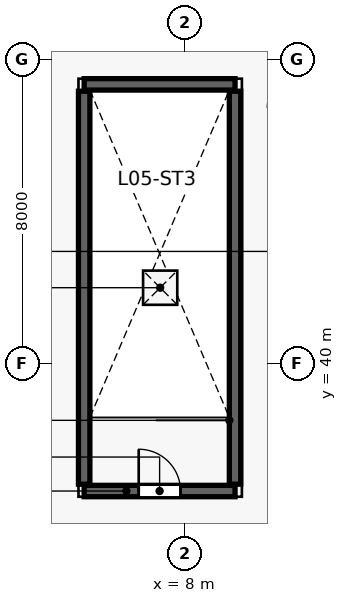
"""IFC4 building model, lengths in metres.
Left out: names, types, materials, properties, quantities, classifications, styles, units other than length and angle.
Written with IfcOpenShell. Run it as: python <this file> out.ifc"""

import sys

from ifc_helpers import new_model, si_unit, direction, frame, frame_2d, origin, origin_2d, place, context, subcontext, project, spatial, rectangle, extrude, source, transform, mapped, element, fill, save


model = new_model("IFC4")
c1 = context("Model", 3, precision=1e-05, world=origin(), true_north=direction((0.0, 1.0)))
c2 = subcontext(c1, "Body", "Model", "MODEL_VIEW")
j1 = project(units=[si_unit("LENGTHUNIT", "METRE"), si_unit("PLANEANGLEUNIT", "RADIAN")], contexts=[c1])
p1 = place(None, origin())
s1 = spatial("IfcSite", under=j1, at=p1, CompositionType="ELEMENT")
p2 = place(p1, origin())
s2 = spatial("IfcBuilding", under=s1, at=p2, CompositionType="ELEMENT")
p3 = place(p2, frame((0.0, 0.0, 30.0)))
s3 = spatial("IfcBuildingStorey", under=s2, at=p3, CompositionType="ELEMENT", Elevation=30.0)
m1 = source(origin(), c2, "Body", "SweptSolid", [
    extrude(rectangle(XDim=3.97, YDim=0.3, at=frame_2d((1.985, 0.0))), origin(), (0.0, 0.0, 1.0), 3.19),
])
p4 = place(p3, frame((5.35, 36.65, 0.0), z_axis=(0.0, 0.0, 1.0), x_axis=(1.0, 0.0, 0.0)))
e1 = element("IfcWall", 1, at=p4, inside=s3, PredefinedType="SOLIDWALL", context=c2, shape_type="MappedRepresentation", body=[
    mapped(m1, transform((0.0, 0.0, 0.0), scale=1.0)),
])
p5 = place(p4, frame((1.435, 0.0, 0.0)))
e2 = element("IfcOpeningElement", 2, at=p5, cuts=e1, PredefinedType="OPENING", context=c2, shape_type="SweptSolid", body=[
    extrude(rectangle(XDim=1.1, YDim=2.2, at=frame_2d((0.55, 1.1))), frame((0.0, 0.16, 0.0), z_axis=(0.0, -1.0, 0.0), x_axis=(1.0, 0.0, 0.0)), (0.0, 0.0, 1.0), 0.32),
])
p6 = place(p3, frame((5.35, 47.35, 0.0), z_axis=(0.0, 0.0, 1.0), x_axis=(1.0, 0.0, 0.0)))
e3 = element("IfcWall", 3, at=p6, inside=s3, PredefinedType="SOLIDWALL", context=c2, shape_type="MappedRepresentation", body=[
    mapped(m1, transform((0.0, 0.0, 0.0), scale=1.0)),
])
m2 = source(origin(), c2, "Body", "SweptSolid", [
    extrude(rectangle(XDim=10.34, YDim=0.3, at=frame_2d((5.17, 0.0))), origin(), (0.0, 0.0, 1.0), 3.19),
])
for number, where, z_axis, x_axis in (
    (4, (5.35, 36.83, 0.0), (0.0, 0.0, 1.0), (0.0, 1.0, 0.0)),
    (5, (9.32, 36.83, 0.0), (0.0, 0.0, 1.0), (0.0, 1.0, 0.0)),
):
    element("IfcWall", number, at=place(p3, frame(where, z_axis=z_axis, x_axis=x_axis)), inside=s3, PredefinedType="SOLIDWALL", context=c2, shape_type="MappedRepresentation", body=[
        mapped(m2, transform((0.0, 0.0, 0.0), scale=1.0)),
    ])
m3 = source(origin(), c2, "Body", "SweptSolid", [
    extrude(rectangle(XDim=1.1, YDim=2.2, at=frame_2d((0.55, 1.1))), frame((0.0, 0.025, 0.0), z_axis=(0.0, -1.0, 0.0), x_axis=(1.0, 0.0, 0.0)), (0.0, 0.0, 1.0), 0.05),
])
p7 = place(p5, origin())
e6 = element("IfcDoor", 6, at=p7, inside=s3, OperationType="SINGLE_SWING_LEFT", PredefinedType="DOOR", context=c2, shape_type="MappedRepresentation", body=[
    mapped(m3, transform((0.0, 0.0, 0.0), scale=1.0)),
])
fill(e2, e6)
p8 = place(p3, frame((0.0, 0.0, 3.19)))
p9 = place(p8, frame((7.35, 42.0, 0.16)))
e7 = element("IfcDoor", 7, at=p9, inside=s3, OperationType="SINGLE_SWING_LEFT", PredefinedType="TRAPDOOR", context=c2, shape_type="SweptSolid", body=[
    extrude(rectangle(XDim=0.9, YDim=0.9, at=origin_2d()), origin(), (0.0, 0.0, 1.0), 0.05),
])
save(model, sys.argv[1])
